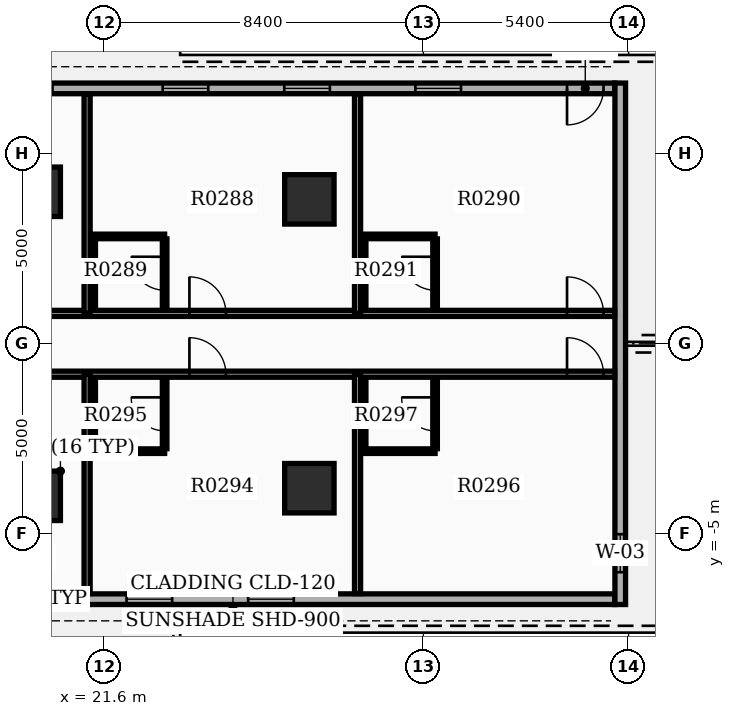
"""IFC4 building model, lengths in metres.
Left out: names, types, materials, properties, quantities, classifications, styles, units other than length and angle.
Written with IfcOpenShell. Run it as: python <this file> out.ifc"""

import sys

from ifc_helpers import new_model, si_unit, direction, frame, frame_2d, origin, origin_2d, place, context, subcontext, project, spatial, rectangle, extrude, element, fill, save


model = new_model("IFC4")
c1 = context("Model", 3, precision=1e-05, world=origin(), true_north=direction((0.0, 1.0)))
c2 = subcontext(c1, "Body", "Model", "MODEL_VIEW")
j1 = project(units=[si_unit("LENGTHUNIT", "METRE"), si_unit("PLANEANGLEUNIT", "RADIAN")], contexts=[c1])
p1 = place(None, origin())
s1 = spatial("IfcSite", under=j1, at=p1, CompositionType="ELEMENT")
p2 = place(p1, origin())
s2 = spatial("IfcBuilding", under=s1, at=p2, CompositionType="ELEMENT")
p3 = place(p2, frame((0.0, 0.0, 23.7)))
s3 = spatial("IfcBuildingStorey", under=s2, at=p3, CompositionType="ELEMENT", Elevation=23.7)
for number, where, z_axis, x_axis in (
    (1, (19.8, -4.0, 0.0), (0.0, 0.0, 1.0), (1.0, 0.0, 0.0)),
    (2, (19.8, 4.0, 0.0), (0.0, 0.0, 1.0), (1.0, 0.0, 0.0)),
    (3, (27.0, -3.8, 0.0), (0.0, 0.0, 1.0), (1.0, 0.0, 0.0)),
    (4, (27.0, 3.8, 0.0), (0.0, 0.0, 1.0), (1.0, 0.0, 0.0)),
):
    element("IfcColumn", number, at=place(p3, frame(where, z_axis=z_axis, x_axis=x_axis)), inside=s3, PredefinedType="COLUMN", context=c2, shape_type="SweptSolid", body=[
        extrude(rectangle(XDim=1.3, YDim=1.3, at=origin_2d()), origin(), (0.0, 0.0, 1.0), 3.9),
    ])
p4 = place(p3, frame((14.94, -6.72, 0.0), z_axis=(0.0, 0.0, 1.0), x_axis=(1.0, 0.0, 0.0)))
e5 = element("IfcWall", 5, at=p4, inside=s3, PredefinedType="STANDARD", context=c2, shape_type="SweptSolid", body=[
    extrude(rectangle(XDim=20.1, YDim=0.28, at=frame_2d((10.05, 0.0))), origin(), (0.0, 0.0, 1.0), 2.91),
])
p5 = place(p4, frame((4.05, 0.0, 0.8)))
e6 = element("IfcOpeningElement", 6, at=p5, cuts=e5, PredefinedType="OPENING", context=c2, shape_type="SweptSolid", body=[
    extrude(rectangle(XDim=1.2, YDim=1.6, at=frame_2d((0.6, 0.8))), frame((0.0, 0.15, 0.0), z_axis=(0.0, -1.0, 0.0), x_axis=(1.0, 0.0, 0.0)), (0.0, 0.0, 1.0), 0.3),
])
p6 = place(p4, frame((7.25, 0.0, 0.8)))
e7 = element("IfcOpeningElement", 7, at=p6, cuts=e5, PredefinedType="OPENING", context=c2, shape_type="SweptSolid", body=[
    extrude(rectangle(XDim=1.2, YDim=1.6, at=frame_2d((0.6, 0.8))), frame((0.0, 0.15, 0.0), z_axis=(0.0, -1.0, 0.0), x_axis=(1.0, 0.0, 0.0)), (0.0, 0.0, 1.0), 0.3),
])
p7 = place(p4, frame((10.45, 0.0, 0.8)))
e8 = element("IfcOpeningElement", 8, at=p7, cuts=e5, PredefinedType="OPENING", context=c2, shape_type="SweptSolid", body=[
    extrude(rectangle(XDim=1.2, YDim=1.6, at=frame_2d((0.6, 0.8))), frame((0.0, 0.15, 0.0), z_axis=(0.0, -1.0, 0.0), x_axis=(1.0, 0.0, 0.0)), (0.0, 0.0, 1.0), 0.3),
])
p8 = place(p4, frame((0.3, 0.0, 0.0)))
e9 = element("IfcOpeningElement", 9, at=p8, cuts=e5, PredefinedType="OPENING", context=c2, shape_type="SweptSolid", body=[
    extrude(rectangle(XDim=0.96, YDim=2.1, at=frame_2d((0.48, 1.05))), frame((0.0, 0.15, 0.0), z_axis=(0.0, -1.0, 0.0), x_axis=(1.0, 0.0, 0.0)), (0.0, 0.0, 1.0), 0.3),
])
p9 = place(p3, frame((35.04, 6.72, 0.0), z_axis=(0.0, 0.0, 1.0), x_axis=(-1.0, 0.0, 0.0)))
e10 = element("IfcWall", 10, at=p9, inside=s3, PredefinedType="STANDARD", context=c2, shape_type="SweptSolid", body=[
    extrude(rectangle(XDim=20.1, YDim=0.28, at=frame_2d((10.05, 0.0))), origin(), (0.0, 0.0, 1.0), 2.91),
])
p10 = place(p9, frame((4.05, 0.0, 0.8)))
e11 = element("IfcOpeningElement", 11, at=p10, cuts=e10, PredefinedType="OPENING", context=c2, shape_type="SweptSolid", body=[
    extrude(rectangle(XDim=1.2, YDim=1.6, at=frame_2d((0.6, 0.8))), frame((0.0, 0.15, 0.0), z_axis=(0.0, -1.0, 0.0), x_axis=(1.0, 0.0, 0.0)), (0.0, 0.0, 1.0), 0.3),
])
p11 = place(p9, frame((7.5, 0.0, 0.8)))
e12 = element("IfcOpeningElement", 12, at=p11, cuts=e10, PredefinedType="OPENING", context=c2, shape_type="SweptSolid", body=[
    extrude(rectangle(XDim=1.2, YDim=1.6, at=frame_2d((0.6, 0.8))), frame((0.0, 0.15, 0.0), z_axis=(0.0, -1.0, 0.0), x_axis=(1.0, 0.0, 0.0)), (0.0, 0.0, 1.0), 0.3),
])
p12 = place(p9, frame((10.7, 0.0, 0.8)))
e13 = element("IfcOpeningElement", 13, at=p12, cuts=e10, PredefinedType="OPENING", context=c2, shape_type="SweptSolid", body=[
    extrude(rectangle(XDim=1.2, YDim=1.6, at=frame_2d((0.6, 0.8))), frame((0.0, 0.15, 0.0), z_axis=(0.0, -1.0, 0.0), x_axis=(1.0, 0.0, 0.0)), (0.0, 0.0, 1.0), 0.3),
])
p13 = place(p9, frame((0.3, 0.0, 0.0)))
e14 = element("IfcOpeningElement", 14, at=p13, cuts=e10, PredefinedType="OPENING", context=c2, shape_type="SweptSolid", body=[
    extrude(rectangle(XDim=0.96, YDim=2.1, at=frame_2d((0.48, 1.05))), frame((0.0, 0.15, 0.0), z_axis=(0.0, -1.0, 0.0), x_axis=(1.0, 0.0, 0.0)), (0.0, 0.0, 1.0), 0.3),
])
p14 = place(p9, frame((14.799, 0.0, 0.85)))
e15 = element("IfcOpeningElement", 15, at=p14, cuts=e10, PredefinedType="OPENING", context=c2, shape_type="SweptSolid", body=[
    extrude(rectangle(XDim=1.2, YDim=1.6, at=frame_2d((0.6, 0.8))), frame((0.0, 0.15, 0.0), z_axis=(0.0, -1.0, 0.0), x_axis=(1.0, 0.0, 0.0)), (0.0, 0.0, 1.0), 0.3),
])
p15 = place(p3, frame((35.18, -6.86, 0.0), z_axis=(0.0, 0.0, 1.0), x_axis=(0.0, 1.0, 0.0)))
e16 = element("IfcWall", 16, at=p15, inside=s3, PredefinedType="STANDARD", context=c2, shape_type="SweptSolid", body=[
    extrude(rectangle(XDim=13.72, YDim=0.28, at=frame_2d((6.86, 0.0))), origin(), (0.0, 0.0, 1.0), 2.91),
])
p16 = place(p15, frame((0.85, 0.0, 0.85)))
e17 = element("IfcOpeningElement", 17, at=p16, cuts=e16, PredefinedType="OPENING", context=c2, shape_type="SweptSolid", body=[
    extrude(rectangle(XDim=1.0, YDim=1.5, at=frame_2d((0.5, 0.75))), frame((0.0, 0.15, 0.0), z_axis=(0.0, -1.0, 0.0), x_axis=(1.0, 0.0, 0.0)), (0.0, 0.0, 1.0), 0.3),
])
p17 = place(p3, frame((14.85, 0.8, 0.0), z_axis=(0.0, 0.0, 1.0), x_axis=(1.0, 0.0, 0.0)))
e18 = element("IfcWall", 18, at=p17, inside=s3, PredefinedType="PARTITIONING", context=c2, shape_type="SweptSolid", body=[
    extrude(rectangle(XDim=20.182, YDim=0.16, at=frame_2d((10.091, 0.0))), origin(), (0.0, 0.0, 1.0), 2.9),
])
p18 = place(p17, frame((2.61, 0.0, 0.0)))
e19 = element("IfcOpeningElement", 19, at=p18, cuts=e18, PredefinedType="OPENING", context=c2, shape_type="SweptSolid", body=[
    extrude(rectangle(XDim=0.96, YDim=2.15, at=frame_2d((0.48, 1.075))), frame((0.0, 0.09, 0.0), z_axis=(0.0, -1.0, 0.0), x_axis=(1.0, 0.0, 0.0)), (0.0, 0.0, 1.0), 0.18),
])
p19 = place(p17, frame((8.994, 0.0, 0.0)))
e20 = element("IfcOpeningElement", 20, at=p19, cuts=e18, PredefinedType="OPENING", context=c2, shape_type="SweptSolid", body=[
    extrude(rectangle(XDim=0.96, YDim=2.15, at=frame_2d((0.48, 1.075))), frame((0.0, 0.09, 0.0), z_axis=(0.0, -1.0, 0.0), x_axis=(1.0, 0.0, 0.0)), (0.0, 0.0, 1.0), 0.18),
])
p20 = place(p17, frame((18.93, 0.0, 0.0)))
e21 = element("IfcOpeningElement", 21, at=p20, cuts=e18, PredefinedType="OPENING", context=c2, shape_type="SweptSolid", body=[
    extrude(rectangle(XDim=0.96, YDim=2.15, at=frame_2d((0.48, 1.075))), frame((0.0, 0.09, 0.0), z_axis=(0.0, -1.0, 0.0), x_axis=(1.0, 0.0, 0.0)), (0.0, 0.0, 1.0), 0.18),
])
for number, where, z_axis, x_axis in (
    (22, (21.152, 0.8, 0.0), (0.0, 0.0, 1.0), (0.0, 1.0, 0.0)),
    (23, (28.268, 0.8, 0.0), (0.0, 0.0, 1.0), (0.0, 1.0, 0.0)),
):
    element("IfcWall", number, at=place(p3, frame(where, z_axis=z_axis, x_axis=x_axis)), inside=s3, PredefinedType="PARTITIONING", context=c2, shape_type="SweptSolid", body=[
        extrude(rectangle(XDim=5.772, YDim=0.16, at=frame_2d((2.886, 0.0))), origin(), (0.0, 0.0, 1.0), 2.9),
    ])
p21 = place(p3, frame((23.192, 0.94, 0.0), z_axis=(0.0, 0.0, 1.0), x_axis=(0.0, 1.0, 0.0)))
e24 = element("IfcWall", 24, at=p21, inside=s3, PredefinedType="PARTITIONING", context=c2, shape_type="SweptSolid", body=[
    extrude(rectangle(XDim=1.82, YDim=0.12, at=frame_2d((0.91, 0.0))), origin(), (0.0, 0.0, 1.0), 2.9),
])
p22 = place(p21, frame((0.47, 0.0, 0.0)))
e25 = element("IfcOpeningElement", 25, at=p22, cuts=e24, PredefinedType="OPENING", context=c2, shape_type="SweptSolid", body=[
    extrude(rectangle(XDim=0.88, YDim=2.1, at=frame_2d((0.44, 1.05))), frame((0.0, 0.07, 0.0), z_axis=(0.0, -1.0, 0.0), x_axis=(1.0, 0.0, 0.0)), (0.0, 0.0, 1.0), 0.14),
])
p23 = place(p3, frame((21.312, 0.94, 0.0), z_axis=(0.0, 0.0, 1.0), x_axis=(0.0, 1.0, 0.0)))
e26 = element("IfcWall", 26, at=p23, inside=s3, PredefinedType="PARTITIONING", context=c2, shape_type="SweptSolid", body=[
    extrude(rectangle(XDim=1.82, YDim=0.12, at=frame_2d((0.91, 0.0))), origin(), (0.0, 0.0, 1.0), 2.9),
])
p24 = place(p3, frame((21.312, 2.825, 0.0), z_axis=(0.0, 0.0, 1.0), x_axis=(1.0, 0.0, 0.0)))
e27 = element("IfcWall", 27, at=p24, inside=s3, PredefinedType="PARTITIONING", context=c2, shape_type="SweptSolid", body=[
    extrude(rectangle(XDim=1.88, YDim=0.12, at=frame_2d((0.94, 0.0))), origin(), (0.0, 0.0, 1.0), 2.9),
])
p25 = place(p3, frame((30.308, 0.94, 0.0), z_axis=(0.0, 0.0, 1.0), x_axis=(0.0, 1.0, 0.0)))
e28 = element("IfcWall", 28, at=p25, inside=s3, PredefinedType="PARTITIONING", context=c2, shape_type="SweptSolid", body=[
    extrude(rectangle(XDim=1.82, YDim=0.12, at=frame_2d((0.91, 0.0))), origin(), (0.0, 0.0, 1.0), 2.9),
])
p26 = place(p25, frame((0.47, 0.0, 0.0)))
e29 = element("IfcOpeningElement", 29, at=p26, cuts=e28, PredefinedType="OPENING", context=c2, shape_type="SweptSolid", body=[
    extrude(rectangle(XDim=0.88, YDim=2.1, at=frame_2d((0.44, 1.05))), frame((0.0, 0.07, 0.0), z_axis=(0.0, -1.0, 0.0), x_axis=(1.0, 0.0, 0.0)), (0.0, 0.0, 1.0), 0.14),
])
p27 = place(p3, frame((28.428, 0.94, 0.0), z_axis=(0.0, 0.0, 1.0), x_axis=(0.0, 1.0, 0.0)))
e30 = element("IfcWall", 30, at=p27, inside=s3, PredefinedType="PARTITIONING", context=c2, shape_type="SweptSolid", body=[
    extrude(rectangle(XDim=1.82, YDim=0.12, at=frame_2d((0.91, 0.0))), origin(), (0.0, 0.0, 1.0), 2.9),
])
p28 = place(p3, frame((28.428, 2.825, 0.0), z_axis=(0.0, 0.0, 1.0), x_axis=(1.0, 0.0, 0.0)))
e31 = element("IfcWall", 31, at=p28, inside=s3, PredefinedType="PARTITIONING", context=c2, shape_type="SweptSolid", body=[
    extrude(rectangle(XDim=1.88, YDim=0.12, at=frame_2d((0.94, 0.0))), origin(), (0.0, 0.0, 1.0), 2.9),
])
p29 = place(p3, frame((14.85, -0.8, 0.0), z_axis=(0.0, 0.0, 1.0), x_axis=(1.0, 0.0, 0.0)))
e32 = element("IfcWall", 32, at=p29, inside=s3, PredefinedType="PARTITIONING", context=c2, shape_type="SweptSolid", body=[
    extrude(rectangle(XDim=20.182, YDim=0.16, at=frame_2d((10.091, 0.0))), origin(), (0.0, 0.0, 1.0), 2.9),
])
p30 = place(p29, frame((2.61, 0.0, 0.0)))
e33 = element("IfcOpeningElement", 33, at=p30, cuts=e32, PredefinedType="OPENING", context=c2, shape_type="SweptSolid", body=[
    extrude(rectangle(XDim=0.96, YDim=2.15, at=frame_2d((0.48, 1.075))), frame((0.0, 0.09, 0.0), z_axis=(0.0, -1.0, 0.0), x_axis=(1.0, 0.0, 0.0)), (0.0, 0.0, 1.0), 0.18),
])
p31 = place(p29, frame((8.994, 0.0, 0.0)))
e34 = element("IfcOpeningElement", 34, at=p31, cuts=e32, PredefinedType="OPENING", context=c2, shape_type="SweptSolid", body=[
    extrude(rectangle(XDim=0.96, YDim=2.15, at=frame_2d((0.48, 1.075))), frame((0.0, 0.09, 0.0), z_axis=(0.0, -1.0, 0.0), x_axis=(1.0, 0.0, 0.0)), (0.0, 0.0, 1.0), 0.18),
])
p32 = place(p29, frame((18.93, 0.0, 0.0)))
e35 = element("IfcOpeningElement", 35, at=p32, cuts=e32, PredefinedType="OPENING", context=c2, shape_type="SweptSolid", body=[
    extrude(rectangle(XDim=0.96, YDim=2.15, at=frame_2d((0.48, 1.075))), frame((0.0, 0.09, 0.0), z_axis=(0.0, -1.0, 0.0), x_axis=(1.0, 0.0, 0.0)), (0.0, 0.0, 1.0), 0.18),
])
for number, where, z_axis, x_axis in (
    (36, (21.152, -0.8, 0.0), (0.0, 0.0, 1.0), (0.0, -1.0, 0.0)),
    (37, (28.268, -0.8, 0.0), (0.0, 0.0, 1.0), (0.0, -1.0, 0.0)),
):
    element("IfcWall", number, at=place(p3, frame(where, z_axis=z_axis, x_axis=x_axis)), inside=s3, PredefinedType="PARTITIONING", context=c2, shape_type="SweptSolid", body=[
        extrude(rectangle(XDim=5.772, YDim=0.16, at=frame_2d((2.886, 0.0))), origin(), (0.0, 0.0, 1.0), 2.9),
    ])
p33 = place(p3, frame((23.192, -2.76, 0.0), z_axis=(0.0, 0.0, 1.0), x_axis=(0.0, 1.0, 0.0)))
e38 = element("IfcWall", 38, at=p33, inside=s3, PredefinedType="PARTITIONING", context=c2, shape_type="SweptSolid", body=[
    extrude(rectangle(XDim=1.82, YDim=0.12, at=frame_2d((0.91, 0.0))), origin(), (0.0, 0.0, 1.0), 2.9),
])
p34 = place(p33, frame((0.47, 0.0, 0.0)))
e39 = element("IfcOpeningElement", 39, at=p34, cuts=e38, PredefinedType="OPENING", context=c2, shape_type="SweptSolid", body=[
    extrude(rectangle(XDim=0.88, YDim=2.1, at=frame_2d((0.44, 1.05))), frame((0.0, 0.07, 0.0), z_axis=(0.0, -1.0, 0.0), x_axis=(1.0, 0.0, 0.0)), (0.0, 0.0, 1.0), 0.14),
])
p35 = place(p3, frame((21.312, -2.76, 0.0), z_axis=(0.0, 0.0, 1.0), x_axis=(0.0, 1.0, 0.0)))
e40 = element("IfcWall", 40, at=p35, inside=s3, PredefinedType="PARTITIONING", context=c2, shape_type="SweptSolid", body=[
    extrude(rectangle(XDim=1.82, YDim=0.12, at=frame_2d((0.91, 0.0))), origin(), (0.0, 0.0, 1.0), 2.9),
])
p36 = place(p3, frame((21.312, -2.825, 0.0), z_axis=(0.0, 0.0, 1.0), x_axis=(1.0, 0.0, 0.0)))
e41 = element("IfcWall", 41, at=p36, inside=s3, PredefinedType="PARTITIONING", context=c2, shape_type="SweptSolid", body=[
    extrude(rectangle(XDim=1.88, YDim=0.12, at=frame_2d((0.94, 0.0))), origin(), (0.0, 0.0, 1.0), 2.9),
])
p37 = place(p3, frame((30.308, -2.76, 0.0), z_axis=(0.0, 0.0, 1.0), x_axis=(0.0, 1.0, 0.0)))
e42 = element("IfcWall", 42, at=p37, inside=s3, PredefinedType="PARTITIONING", context=c2, shape_type="SweptSolid", body=[
    extrude(rectangle(XDim=1.82, YDim=0.12, at=frame_2d((0.91, 0.0))), origin(), (0.0, 0.0, 1.0), 2.9),
])
p38 = place(p37, frame((0.47, 0.0, 0.0)))
e43 = element("IfcOpeningElement", 43, at=p38, cuts=e42, PredefinedType="OPENING", context=c2, shape_type="SweptSolid", body=[
    extrude(rectangle(XDim=0.88, YDim=2.1, at=frame_2d((0.44, 1.05))), frame((0.0, 0.07, 0.0), z_axis=(0.0, -1.0, 0.0), x_axis=(1.0, 0.0, 0.0)), (0.0, 0.0, 1.0), 0.14),
])
p39 = place(p3, frame((28.428, -2.76, 0.0), z_axis=(0.0, 0.0, 1.0), x_axis=(0.0, 1.0, 0.0)))
e44 = element("IfcWall", 44, at=p39, inside=s3, PredefinedType="PARTITIONING", context=c2, shape_type="SweptSolid", body=[
    extrude(rectangle(XDim=1.82, YDim=0.12, at=frame_2d((0.91, 0.0))), origin(), (0.0, 0.0, 1.0), 2.9),
])
p40 = place(p3, frame((28.428, -2.825, 0.0), z_axis=(0.0, 0.0, 1.0), x_axis=(1.0, 0.0, 0.0)))
e45 = element("IfcWall", 45, at=p40, inside=s3, PredefinedType="PARTITIONING", context=c2, shape_type="SweptSolid", body=[
    extrude(rectangle(XDim=1.88, YDim=0.12, at=frame_2d((0.94, 0.0))), origin(), (0.0, 0.0, 1.0), 2.9),
])
p41 = place(p6, origin())
e46 = element("IfcWindow", 46, at=p41, inside=s3, PartitioningType="SINGLE_PANEL", PredefinedType="WINDOW", context=c2, shape_type="SweptSolid", body=[
    extrude(rectangle(XDim=1.2, YDim=1.6, at=frame_2d((0.6, 0.8))), frame((0.0, 0.03, 0.0), z_axis=(0.0, -1.0, 0.0), x_axis=(1.0, 0.0, 0.0)), (0.0, 0.0, 1.0), 0.06),
])
fill(e7, e46)
p42 = place(p7, origin())
e47 = element("IfcWindow", 47, at=p42, inside=s3, PartitioningType="SINGLE_PANEL", PredefinedType="WINDOW", context=c2, shape_type="SweptSolid", body=[
    extrude(rectangle(XDim=1.2, YDim=1.6, at=frame_2d((0.6, 0.8))), frame((0.0, 0.03, 0.0), z_axis=(0.0, -1.0, 0.0), x_axis=(1.0, 0.0, 0.0)), (0.0, 0.0, 1.0), 0.06),
])
fill(e8, e47)
p43 = place(p10, origin())
e48 = element("IfcWindow", 48, at=p43, inside=s3, PartitioningType="SINGLE_PANEL", PredefinedType="WINDOW", context=c2, shape_type="SweptSolid", body=[
    extrude(rectangle(XDim=1.2, YDim=1.6, at=frame_2d((0.6, 0.8))), frame((0.0, 0.03, 0.0), z_axis=(0.0, -1.0, 0.0), x_axis=(1.0, 0.0, 0.0)), (0.0, 0.0, 1.0), 0.06),
])
fill(e11, e48)
p44 = place(p11, origin())
e49 = element("IfcWindow", 49, at=p44, inside=s3, PartitioningType="SINGLE_PANEL", PredefinedType="WINDOW", context=c2, shape_type="SweptSolid", body=[
    extrude(rectangle(XDim=1.2, YDim=1.6, at=frame_2d((0.6, 0.8))), frame((0.0, 0.03, 0.0), z_axis=(0.0, -1.0, 0.0), x_axis=(1.0, 0.0, 0.0)), (0.0, 0.0, 1.0), 0.06),
])
fill(e12, e49)
p45 = place(p12, origin())
e50 = element("IfcWindow", 50, at=p45, inside=s3, PartitioningType="SINGLE_PANEL", PredefinedType="WINDOW", context=c2, shape_type="SweptSolid", body=[
    extrude(rectangle(XDim=1.2, YDim=1.6, at=frame_2d((0.6, 0.8))), frame((0.0, 0.03, 0.0), z_axis=(0.0, -1.0, 0.0), x_axis=(1.0, 0.0, 0.0)), (0.0, 0.0, 1.0), 0.06),
])
fill(e13, e50)
p46 = place(p16, origin())
e51 = element("IfcWindow", 51, at=p46, inside=s3, PartitioningType="SINGLE_PANEL", PredefinedType="WINDOW", context=c2, shape_type="SweptSolid", body=[
    extrude(rectangle(XDim=1.0, YDim=1.5, at=frame_2d((0.5, 0.75))), frame((0.0, 0.03, 0.0), z_axis=(0.0, -1.0, 0.0), x_axis=(1.0, 0.0, 0.0)), (0.0, 0.0, 1.0), 0.06),
])
fill(e17, e51)
p47 = place(p13, origin())
e52 = element("IfcDoor", 52, at=p47, inside=s3, OperationType="SINGLE_SWING_RIGHT", PredefinedType="DOOR", context=c2, shape_type="SweptSolid", body=[
    extrude(rectangle(XDim=0.96, YDim=2.1, at=frame_2d((0.48, 1.05))), frame((0.0, 0.025, 0.0), z_axis=(0.0, -1.0, 0.0), x_axis=(1.0, 0.0, 0.0)), (0.0, 0.0, 1.0), 0.05),
])
fill(e14, e52)
p48 = place(p14, origin())
e53 = element("IfcWindow", 53, at=p48, inside=s3, PartitioningType="SINGLE_PANEL", PredefinedType="WINDOW", context=c2, shape_type="SweptSolid", body=[
    extrude(rectangle(XDim=1.2, YDim=1.6, at=frame_2d((0.6, 0.8))), frame((0.0, 0.03, 0.0), z_axis=(0.0, -1.0, 0.0), x_axis=(1.0, 0.0, 0.0)), (0.0, 0.0, 1.0), 0.06),
])
fill(e15, e53)
p49 = place(p19, origin())
e54 = element("IfcDoor", 54, at=p49, inside=s3, OperationType="SINGLE_SWING_LEFT", PredefinedType="DOOR", context=c2, shape_type="SweptSolid", body=[
    extrude(rectangle(XDim=0.96, YDim=2.15, at=frame_2d((0.48, 1.075))), frame((0.0, 0.025, 0.0), z_axis=(0.0, -1.0, 0.0), x_axis=(1.0, 0.0, 0.0)), (0.0, 0.0, 1.0), 0.05),
])
fill(e20, e54)
p50 = place(p22, origin())
e55 = element("IfcDoor", 55, at=p50, inside=s3, OperationType="SINGLE_SWING_RIGHT", PredefinedType="DOOR", context=c2, shape_type="SweptSolid", body=[
    extrude(rectangle(XDim=0.88, YDim=2.1, at=frame_2d((0.44, 1.05))), frame((0.0, 0.025, 0.0), z_axis=(0.0, -1.0, 0.0), x_axis=(1.0, 0.0, 0.0)), (0.0, 0.0, 1.0), 0.05),
])
fill(e25, e55)
p51 = place(p20, origin())
e56 = element("IfcDoor", 56, at=p51, inside=s3, OperationType="SINGLE_SWING_LEFT", PredefinedType="DOOR", context=c2, shape_type="SweptSolid", body=[
    extrude(rectangle(XDim=0.96, YDim=2.15, at=frame_2d((0.48, 1.075))), frame((0.0, 0.025, 0.0), z_axis=(0.0, -1.0, 0.0), x_axis=(1.0, 0.0, 0.0)), (0.0, 0.0, 1.0), 0.05),
])
fill(e21, e56)
p52 = place(p26, origin())
e57 = element("IfcDoor", 57, at=p52, inside=s3, OperationType="SINGLE_SWING_RIGHT", PredefinedType="DOOR", context=c2, shape_type="SweptSolid", body=[
    extrude(rectangle(XDim=0.88, YDim=2.1, at=frame_2d((0.44, 1.05))), frame((0.0, 0.025, 0.0), z_axis=(0.0, -1.0, 0.0), x_axis=(1.0, 0.0, 0.0)), (0.0, 0.0, 1.0), 0.05),
])
fill(e29, e57)
p53 = place(p31, origin())
e58 = element("IfcDoor", 58, at=p53, inside=s3, OperationType="SINGLE_SWING_LEFT", PredefinedType="DOOR", context=c2, shape_type="SweptSolid", body=[
    extrude(rectangle(XDim=0.96, YDim=2.15, at=frame_2d((0.48, 1.075))), frame((0.0, 0.025, 0.0), z_axis=(0.0, -1.0, 0.0), x_axis=(1.0, 0.0, 0.0)), (0.0, 0.0, 1.0), 0.05),
])
fill(e34, e58)
p54 = place(p34, origin())
e59 = element("IfcDoor", 59, at=p54, inside=s3, OperationType="SINGLE_SWING_RIGHT", PredefinedType="DOOR", context=c2, shape_type="SweptSolid", body=[
    extrude(rectangle(XDim=0.88, YDim=2.1, at=frame_2d((0.44, 1.05))), frame((0.0, 0.025, 0.0), z_axis=(0.0, -1.0, 0.0), x_axis=(1.0, 0.0, 0.0)), (0.0, 0.0, 1.0), 0.05),
])
fill(e39, e59)
p55 = place(p32, origin())
e60 = element("IfcDoor", 60, at=p55, inside=s3, OperationType="SINGLE_SWING_LEFT", PredefinedType="DOOR", context=c2, shape_type="SweptSolid", body=[
    extrude(rectangle(XDim=0.96, YDim=2.15, at=frame_2d((0.48, 1.075))), frame((0.0, 0.025, 0.0), z_axis=(0.0, -1.0, 0.0), x_axis=(1.0, 0.0, 0.0)), (0.0, 0.0, 1.0), 0.05),
])
fill(e35, e60)
p56 = place(p38, origin())
e61 = element("IfcDoor", 61, at=p56, inside=s3, OperationType="SINGLE_SWING_RIGHT", PredefinedType="DOOR", context=c2, shape_type="SweptSolid", body=[
    extrude(rectangle(XDim=0.88, YDim=2.1, at=frame_2d((0.44, 1.05))), frame((0.0, 0.025, 0.0), z_axis=(0.0, -1.0, 0.0), x_axis=(1.0, 0.0, 0.0)), (0.0, 0.0, 1.0), 0.05),
])
fill(e43, e61)
save(model, sys.argv[1])
